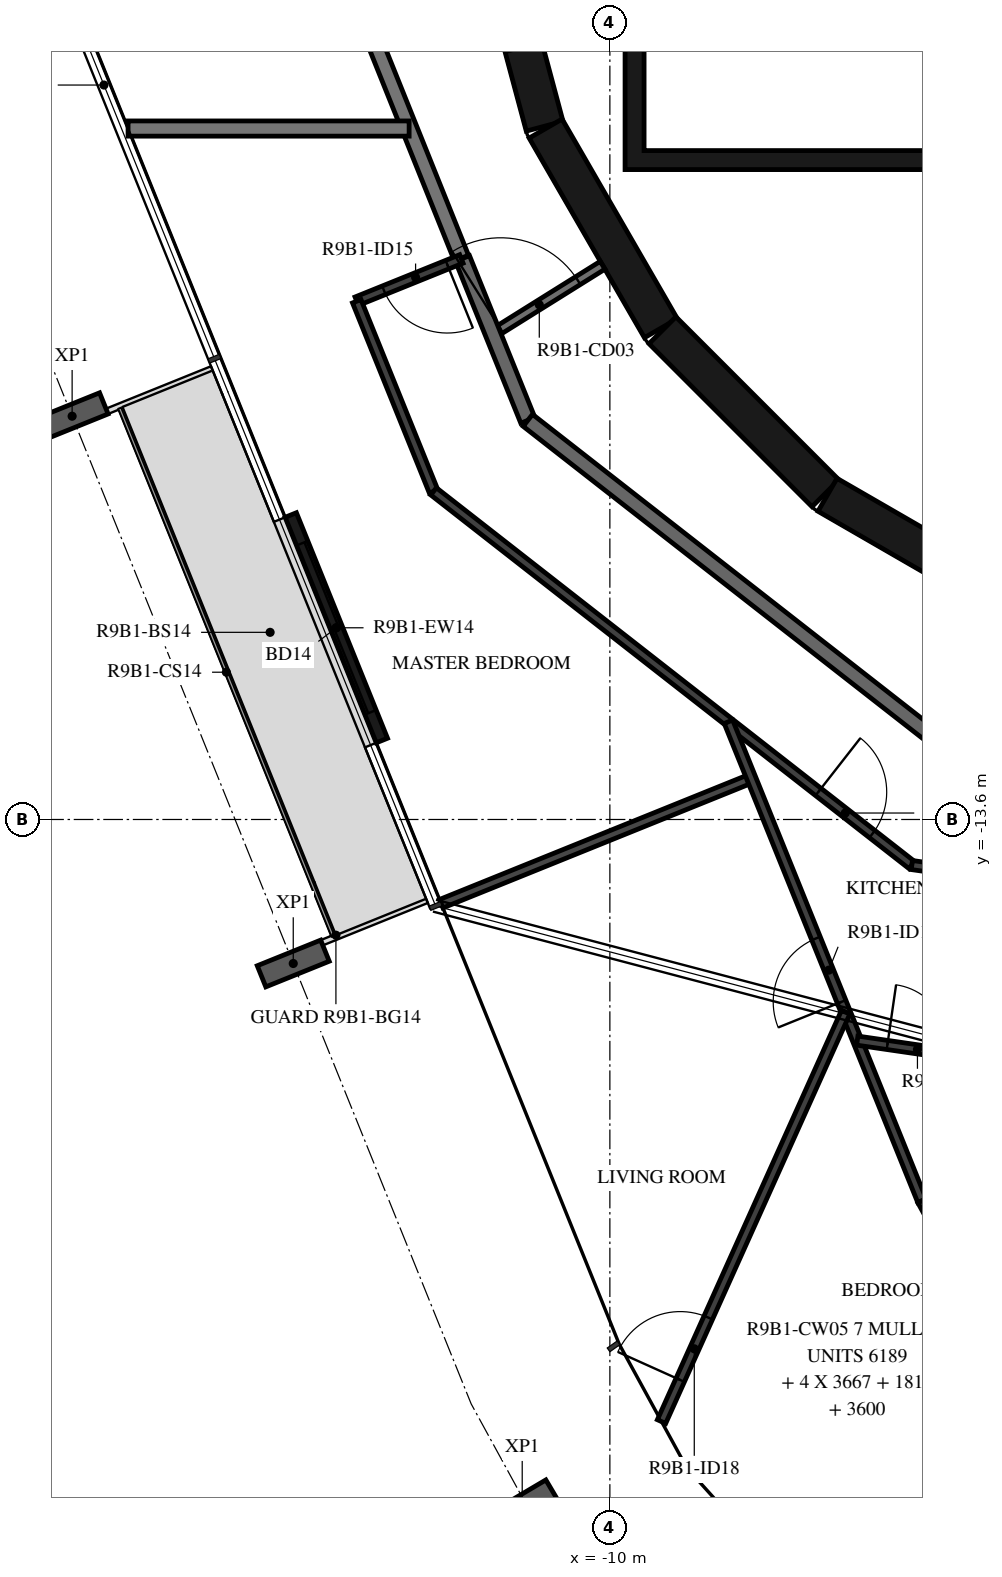
"""IFC4 building model, lengths in metres.
Left out: names, types, materials, properties, quantities, classifications, styles, units other than length and angle.
Written with IfcOpenShell. Run it as: python <this file> out.ifc"""

import sys

from ifc_helpers import new_model, si_unit, direction, frame, frame_2d, origin, origin_2d, place, context, subcontext, project, spatial, polyline, rectangle, i_section, outline, extrude, element, fill, save


model = new_model("IFC4")
c1 = context("Model", 3, precision=1e-05, world=origin(), true_north=direction((0.0, 1.0)))
c2 = subcontext(c1, "Body", "Model", "MODEL_VIEW")
j1 = project(units=[si_unit("LENGTHUNIT", "METRE"), si_unit("PLANEANGLEUNIT", "RADIAN")], contexts=[c1])
p1 = place(None, origin())
s1 = spatial("IfcSite", under=j1, at=p1, CompositionType="ELEMENT")
p2 = place(p1, origin())
s2 = spatial("IfcBuilding", under=s1, at=p2, CompositionType="ELEMENT")
p3 = place(p2, frame((0.0, 0.0, 350.5)))
s3 = spatial("IfcBuildingStorey", under=s2, at=p3, CompositionType="ELEMENT", Elevation=350.5)
for number, where, z_axis, x_axis in (
    (1, (-17.075, -8.294, -0.38), (0.0, 0.0, 1.0), (-0.375, 0.927, 0.0)),
    (2, (-14.166, -15.495, -0.38), (0.0, 0.0, 1.0), (-0.375, 0.927, 0.0)),
    (3, (-11.153, -22.647, -0.38), (0.0, 0.0, 1.0), (-0.509, 0.861, 0.0)),
):
    element("IfcColumn", number, at=place(p3, frame(where, z_axis=z_axis, x_axis=x_axis)), inside=s3, PredefinedType="COLUMN", context=c2, shape_type="SweptSolid", body=[
        extrude(i_section(OverallWidth=0.3, OverallDepth=0.9, WebThickness=0.019, FlangeThickness=0.035, FilletRadius=0.03, at=origin_2d()), origin(), (0.0, 0.0, 1.0), 3.5),
    ])
p4 = place(p3, frame((-14.198, -9.594, 0.0), z_axis=(0.0, 0.0, 1.0), x_axis=(0.374624519695, -0.927176611678, 0.0)))
e4 = element("IfcWall", 4, at=p4, inside=s3, PredefinedType="STANDARD", context=c2, shape_type="SweptSolid", body=[
    extrude(rectangle(XDim=3.2, YDim=0.16, at=frame_2d((1.6, 0.0))), origin(), (0.0, 0.0, 1.0), 3.12),
])
p5 = place(p4, frame((0.4, 0.0, 0.0)))
e5 = element("IfcOpeningElement", 5, at=p5, cuts=e4, PredefinedType="OPENING", context=c2, shape_type="SweptSolid", body=[
    extrude(rectangle(XDim=2.4, YDim=2.4, at=frame_2d((1.2, 1.2))), frame((0.0, 0.09, 0.0), z_axis=(0.0, -1.0, 0.0), x_axis=(1.0, 0.0, 0.0)), (0.0, 0.0, 1.0), 0.18),
])
p6 = place(p3, frame((-11.643, -1.55, 0.0), z_axis=(0.0, 0.0, 1.0), x_axis=(0.258734743916, -0.965948410781, 0.0)))
e6 = element("IfcWall", 6, at=p6, inside=s3, PredefinedType="SHEAR", context=c2, shape_type="SweptSolid", body=[
    extrude(rectangle(XDim=3.033, YDim=0.5, at=frame_2d((1.516, 0.0))), origin(), (0.0, 0.0, 1.0), 3.12),
])
p7 = place(p6, frame((1.066, 0.0, 0.0)))
e7 = element("IfcOpeningElement", 7, at=p7, cuts=e6, PredefinedType="OPENING", context=c2, shape_type="SweptSolid", body=[
    extrude(rectangle(XDim=0.9, YDim=2.1, at=frame_2d((0.45, 1.05))), frame((0.0, 0.26, 0.0), z_axis=(0.0, -1.0, 0.0), x_axis=(1.0, 0.0, 0.0)), (0.0, 0.0, 1.0), 0.52),
])
p8 = place(p3, frame((-10.845, -4.51, 0.0), z_axis=(0.0, 0.0, 1.0), x_axis=(0.500087131594, -0.865975092491, 0.0)))
e8 = element("IfcWall", 8, at=p8, inside=s3, PredefinedType="SHEAR", context=c2, shape_type="SweptSolid", body=[
    extrude(rectangle(XDim=3.033, YDim=0.5, at=frame_2d((1.516, 0.0))), origin(), (0.0, 0.0, 1.0), 3.12),
])
p9 = place(p3, frame((-9.308, -7.164, 0.0), z_axis=(0.0, 0.0, 1.0), x_axis=(0.707106781187, -0.707106781187, 0.0)))
e9 = element("IfcWall", 9, at=p9, inside=s3, PredefinedType="SHEAR", context=c2, shape_type="SweptSolid", body=[
    extrude(rectangle(XDim=3.032, YDim=0.5, at=frame_2d((1.516, 0.0))), origin(), (0.0, 0.0, 1.0), 3.12),
])
p10 = place(p3, frame((-7.137, -9.329, 0.0), z_axis=(0.0, 0.0, 1.0), x_axis=(0.865975092491, -0.500087131594, 0.0)))
e10 = element("IfcWall", 10, at=p10, inside=s3, PredefinedType="SHEAR", context=c2, shape_type="SweptSolid", body=[
    extrude(rectangle(XDim=3.033, YDim=0.5, at=frame_2d((1.516, 0.0))), origin(), (0.0, 0.0, 1.0), 3.12),
])
p11 = place(p3, origin())
e11 = element("IfcWall", 11, at=p11, inside=s3, PredefinedType="SHEAR", context=c2, shape_type="SweptSolid", body=[
    extrude(outline(polyline([(9.8, -5.05), (9.8, -4.8), (9.8, -1.9), (9.55, -1.9), (9.55, -4.8), (7.65, -4.8), (7.65, -1.9), (7.4, -1.9), (7.4, -4.8), (5.5, -4.8), (5.5, -1.9), (5.25, -1.9), (5.25, -4.8), (3.35, -4.8), (3.35, -1.9), (3.1, -1.9), (3.1, -4.8), (1.2, -4.8), (1.2, -1.9), (0.95, -1.9), (0.95, -4.8), (-0.95, -4.8), (-0.95, -1.9), (-1.2, -1.9), (-1.2, -4.8), (-3.1, -4.8), (-3.1, -1.9), (-3.35, -1.9), (-3.35, -4.8), (-5.25, -4.8), (-5.25, -1.9), (-5.5, -1.9), (-5.5, -4.8), (-9.55, -4.8), (-9.55, -1.9), (-9.8, -1.9), (-9.8, -4.8), (-9.8, -5.05), (9.8, -5.05)])), origin(), (0.0, 0.0, 1.0), 3.12),
])
p12 = place(p3, frame((-11.539, -7.21, 0.0), z_axis=(0.0, 0.0, 1.0), x_axis=(0.848103039868, 0.529831325769, 0.0)))
e12 = element("IfcWall", 12, at=p12, inside=s3, PredefinedType="PARTITIONING", context=c2, shape_type="SweptSolid", body=[
    extrude(rectangle(XDim=1.702, YDim=0.12, at=frame_2d((0.851, 0.0))), origin(), (0.0, 0.0, 1.0), 3.12),
])
p13 = place(p12, frame((0.12, 0.0, 0.0)))
e13 = element("IfcOpeningElement", 13, at=p13, cuts=e12, PredefinedType="OPENING", context=c2, shape_type="SweptSolid", body=[
    extrude(rectangle(XDim=1.2, YDim=2.1, at=frame_2d((0.6, 1.05))), frame((0.0, 0.07, 0.0), z_axis=(0.0, -1.0, 0.0), x_axis=(1.0, 0.0, 0.0)), (0.0, 0.0, 1.0), 0.14),
])
p14 = place(p3, frame((-13.769, -1.691, 0.0), z_axis=(0.0, 0.0, 1.0), x_axis=(0.372720094028, -0.927943819155, 0.0)))
e14 = element("IfcWall", 14, at=p14, inside=s3, PredefinedType="STANDARD", context=c2, shape_type="SweptSolid", body=[
    extrude(rectangle(XDim=4.875, YDim=0.2, at=frame_2d((2.438, 0.0))), origin(), (0.0, 0.0, 1.0), 3.12),
])
p15 = place(p3, frame((-11.939, -6.22, 0.0), z_axis=(0.0, 0.0, 1.0), x_axis=(0.374651128394, -0.927165860024, 0.0)))
e15 = element("IfcWall", 15, at=p15, inside=s3, PredefinedType="STANDARD", context=c2, shape_type="SweptSolid", body=[
    extrude(rectangle(XDim=2.296, YDim=0.2, at=frame_2d((1.148, 0.0))), origin(), (0.0, 0.0, 1.0), 3.12),
])
p16 = place(p3, frame((-11.079, -8.349, 0.0), z_axis=(0.0, 0.0, 1.0), x_axis=(0.78800478687, -0.615669112324, 0.0)))
e16 = element("IfcWall", 16, at=p16, inside=s3, PredefinedType="STANDARD", context=c2, shape_type="SweptSolid", body=[
    extrude(rectangle(XDim=7.181, YDim=0.2, at=frame_2d((3.591, 0.0))), origin(), (0.0, 0.0, 1.0), 3.12),
])
p17 = place(p3, frame((-16.339, -4.51, 0.0), z_axis=(0.0, 0.0, 1.0), x_axis=(1.0, 0.0, 0.0)))
e17 = element("IfcWall", 17, at=p17, inside=s3, PredefinedType="STANDARD", context=c2, shape_type="SweptSolid", body=[
    extrude(rectangle(XDim=3.698, YDim=0.2, at=frame_2d((1.849, 0.0))), origin(), (0.0, 0.0, 1.0), 3.12),
])
p18 = place(p3, frame((-11.953, -6.225, 0.0), z_axis=(0.0, 0.0, 1.0), x_axis=(-0.927144096717, -0.374704982518, 0.0)))
e18 = element("IfcWall", 18, at=p18, inside=s3, PredefinedType="PARTITIONING", context=c2, shape_type="SweptSolid", body=[
    extrude(rectangle(XDim=1.485, YDim=0.12, at=frame_2d((0.742, 0.0))), origin(), (0.0, 0.0, 1.0), 3.12),
])
p19 = place(p18, frame((0.2, 0.0, 0.0)))
e19 = element("IfcOpeningElement", 19, at=p19, cuts=e18, PredefinedType="OPENING", context=c2, shape_type="SweptSolid", body=[
    extrude(rectangle(XDim=0.9, YDim=2.1, at=frame_2d((0.45, 1.05))), frame((0.0, 0.07, 0.0), z_axis=(0.0, -1.0, 0.0), x_axis=(1.0, 0.0, 0.0)), (0.0, 0.0, 1.0), 0.14),
])
p20 = place(p3, frame((-13.33, -6.782, 0.0), z_axis=(0.0, 0.0, 1.0), x_axis=(0.374602180132, -0.927185637637, 0.0)))
e20 = element("IfcWall", 20, at=p20, inside=s3, PredefinedType="PARTITIONING", context=c2, shape_type="SweptSolid", body=[
    extrude(rectangle(XDim=2.698, YDim=0.12, at=frame_2d((1.349, 0.0))), origin(), (0.0, 0.0, 1.0), 3.12),
])
p21 = place(p3, frame((-12.319, -9.283, 0.0), z_axis=(0.0, 0.0, 1.0), x_axis=(0.788000268464, -0.61567489546, 0.0)))
e21 = element("IfcWall", 21, at=p21, inside=s3, PredefinedType="PARTITIONING", context=c2, shape_type="SweptSolid", body=[
    extrude(rectangle(XDim=7.985, YDim=0.12, at=frame_2d((3.992, 0.0))), origin(), (0.0, 0.0, 1.0), 3.12),
])
p22 = place(p21, frame((6.423, 0.0, 0.0)))
e22 = element("IfcOpeningElement", 22, at=p22, cuts=e21, PredefinedType="OPENING", context=c2, shape_type="SweptSolid", body=[
    extrude(rectangle(XDim=0.9, YDim=2.1, at=frame_2d((0.45, 1.05))), frame((0.0, 0.07, 0.0), z_axis=(0.0, -1.0, 0.0), x_axis=(1.0, 0.0, 0.0)), (0.0, 0.0, 1.0), 0.14),
])
p23 = place(p3, frame((-6.027, -14.199, 0.0), z_axis=(0.0, 0.0, 1.0), x_axis=(0.990271617837, -0.139147845494, 0.0)))
e23 = element("IfcWall", 23, at=p23, inside=s3, PredefinedType="PARTITIONING", context=c2, shape_type="SweptSolid", body=[
    extrude(rectangle(XDim=7.308, YDim=0.12, at=frame_2d((3.654, 0.0))), origin(), (0.0, 0.0, 1.0), 3.12),
])
p24 = place(p23, frame((5.093, 0.0, 0.0)))
e24 = element("IfcOpeningElement", 24, at=p24, cuts=e23, PredefinedType="OPENING", context=c2, shape_type="SweptSolid", body=[
    extrude(rectangle(XDim=0.8, YDim=2.1, at=frame_2d((0.4, 1.05))), frame((0.0, 0.07, 0.0), z_axis=(0.0, -1.0, 0.0), x_axis=(1.0, 0.0, 0.0)), (0.0, 0.0, 1.0), 0.14),
])
p25 = place(p3, frame((-12.219, -14.708, 0.0), z_axis=(0.0, 0.0, 1.0), x_axis=(0.927189216671, 0.374593321469, 0.0)))
e25 = element("IfcWall", 25, at=p25, inside=s3, PredefinedType="PARTITIONING", context=c2, shape_type="SweptSolid", body=[
    extrude(rectangle(XDim=4.4, YDim=0.12, at=frame_2d((2.2, 0.0))), origin(), (0.0, 0.0, 1.0), 2.73),
])
p26 = place(p3, frame((-5.894, -18.616, 0.0), z_axis=(0.0, 0.0, 1.0), x_axis=(-0.374596683143, 0.927187858515, 0.0)))
e26 = element("IfcWall", 26, at=p26, inside=s3, PredefinedType="PARTITIONING", context=c2, shape_type="SweptSolid", body=[
    extrude(rectangle(XDim=6.796, YDim=0.12, at=frame_2d((3.398, 0.0))), origin(), (0.0, 0.0, 1.0), 3.12),
])
p27 = place(p26, frame((2.822, 0.0, 0.0)))
e27 = element("IfcOpeningElement", 27, at=p27, cuts=e26, PredefinedType="OPENING", context=c2, shape_type="SweptSolid", body=[
    extrude(rectangle(XDim=0.9, YDim=2.1, at=frame_2d((0.45, 1.05))), frame((0.0, 0.07, 0.0), z_axis=(0.0, -1.0, 0.0), x_axis=(1.0, 0.0, 0.0)), (0.0, 0.0, 1.0), 0.14),
])
p28 = place(p3, frame((-9.32, -21.521, 0.0), z_axis=(0.0, 0.0, 1.0), x_axis=(0.410206582363, 0.911992631432, 0.0)))
e28 = element("IfcWall", 28, at=p28, inside=s3, PredefinedType="PARTITIONING", context=c2, shape_type="SweptSolid", body=[
    extrude(rectangle(XDim=5.908, YDim=0.12, at=frame_2d((2.954, 0.0))), origin(), (0.0, 0.0, 1.0), 3.12),
])
p29 = place(p28, frame((0.6, 0.0, 0.0)))
e29 = element("IfcOpeningElement", 29, at=p29, cuts=e28, PredefinedType="OPENING", context=c2, shape_type="SweptSolid", body=[
    extrude(rectangle(XDim=0.9, YDim=2.1, at=frame_2d((0.45, 1.05))), frame((0.0, 0.07, 0.0), z_axis=(0.0, -1.0, 0.0), x_axis=(1.0, 0.0, 0.0)), (0.0, 0.0, 1.0), 0.14),
])
p30 = place(p3, frame((-6.745, -16.509, 0.0), z_axis=(0.0, 0.0, 1.0), x_axis=(0.989610924185, -0.143771411393, 0.0)))
e30 = element("IfcWall", 30, at=p30, inside=s3, PredefinedType="PARTITIONING", context=c2, shape_type="SweptSolid", body=[
    extrude(rectangle(XDim=2.865, YDim=0.12, at=frame_2d((1.432, 0.0))), origin(), (0.0, 0.0, 1.0), 3.12),
])
p31 = place(p30, frame((0.4, 0.0, 0.0)))
e31 = element("IfcOpeningElement", 31, at=p31, cuts=e30, PredefinedType="OPENING", context=c2, shape_type="SweptSolid", body=[
    extrude(rectangle(XDim=0.8, YDim=2.1, at=frame_2d((0.4, 1.05))), frame((0.0, 0.07, 0.0), z_axis=(0.0, -1.0, 0.0), x_axis=(1.0, 0.0, 0.0)), (0.0, 0.0, 1.0), 0.14),
])
p32 = place(p3, frame((-5.373, -19.57, 0.0), z_axis=(0.0, 0.0, 1.0), x_axis=(-0.479796131471, 0.87738000446, 0.0)))
e32 = element("IfcWall", 32, at=p32, inside=s3, PredefinedType="PARTITIONING", context=c2, shape_type="SweptSolid", body=[
    extrude(rectangle(XDim=1.087, YDim=0.12, at=frame_2d((0.543, 0.0))), origin(), (0.0, 0.0, 1.0), 3.12),
])
p33 = place(p5, origin())
e33 = element("IfcDoor", 33, at=p33, inside=s3, OperationType="DOUBLE_DOOR_SLIDING", PredefinedType="DOOR", context=c2, shape_type="SweptSolid", body=[
    extrude(rectangle(XDim=2.4, YDim=2.4, at=frame_2d((1.2, 1.2))), frame((0.0, 0.025, 0.0), z_axis=(0.0, -1.0, 0.0), x_axis=(1.0, 0.0, 0.0)), (0.0, 0.0, 1.0), 0.05),
])
fill(e5, e33)
p34 = place(p19, origin())
e34 = element("IfcDoor", 34, at=p34, inside=s3, OperationType="SINGLE_SWING_LEFT", PredefinedType="DOOR", context=c2, shape_type="SweptSolid", body=[
    extrude(rectangle(XDim=0.9, YDim=2.1, at=frame_2d((0.45, 1.05))), frame((0.0, 0.025, 0.0), z_axis=(0.0, -1.0, 0.0), x_axis=(1.0, 0.0, 0.0)), (0.0, 0.0, 1.0), 0.05),
])
fill(e19, e34)
p35 = place(p22, origin())
e35 = element("IfcDoor", 35, at=p35, inside=s3, OperationType="SINGLE_SWING_RIGHT", PredefinedType="DOOR", context=c2, shape_type="SweptSolid", body=[
    extrude(rectangle(XDim=0.9, YDim=2.1, at=frame_2d((0.45, 1.05))), frame((0.0, 0.025, 0.0), z_axis=(0.0, -1.0, 0.0), x_axis=(1.0, 0.0, 0.0)), (0.0, 0.0, 1.0), 0.05),
])
fill(e22, e35)
p36 = place(p27, origin())
e36 = element("IfcDoor", 36, at=p36, inside=s3, OperationType="SINGLE_SWING_RIGHT", PredefinedType="DOOR", context=c2, shape_type="SweptSolid", body=[
    extrude(rectangle(XDim=0.9, YDim=2.1, at=frame_2d((0.45, 1.05))), frame((0.0, 0.025, 0.0), z_axis=(0.0, -1.0, 0.0), x_axis=(1.0, 0.0, 0.0)), (0.0, 0.0, 1.0), 0.05),
])
fill(e27, e36)
p37 = place(p29, origin())
e37 = element("IfcDoor", 37, at=p37, inside=s3, OperationType="SINGLE_SWING_RIGHT", PredefinedType="DOOR", context=c2, shape_type="SweptSolid", body=[
    extrude(rectangle(XDim=0.9, YDim=2.1, at=frame_2d((0.45, 1.05))), frame((0.0, 0.025, 0.0), z_axis=(0.0, -1.0, 0.0), x_axis=(1.0, 0.0, 0.0)), (0.0, 0.0, 1.0), 0.05),
])
fill(e29, e37)
p38 = place(p31, origin())
e38 = element("IfcDoor", 38, at=p38, inside=s3, OperationType="SINGLE_SWING_RIGHT", PredefinedType="DOOR", context=c2, shape_type="SweptSolid", body=[
    extrude(rectangle(XDim=0.8, YDim=2.1, at=frame_2d((0.4, 1.05))), frame((0.0, 0.025, 0.0), z_axis=(0.0, -1.0, 0.0), x_axis=(1.0, 0.0, 0.0)), (0.0, 0.0, 1.0), 0.05),
])
fill(e31, e38)
p39 = place(p13, origin())
e39 = element("IfcDoor", 39, at=p39, inside=s3, OperationType="DOUBLE_DOOR_SINGLE_SWING", PredefinedType="DOOR", context=c2, shape_type="SweptSolid", body=[
    extrude(rectangle(XDim=1.2, YDim=2.1, at=frame_2d((0.6, 1.05))), frame((0.0, 0.025, 0.0), z_axis=(0.0, -1.0, 0.0), x_axis=(1.0, 0.0, 0.0)), (0.0, 0.0, 1.0), 0.05),
])
fill(e13, e39)
save(model, sys.argv[1])
